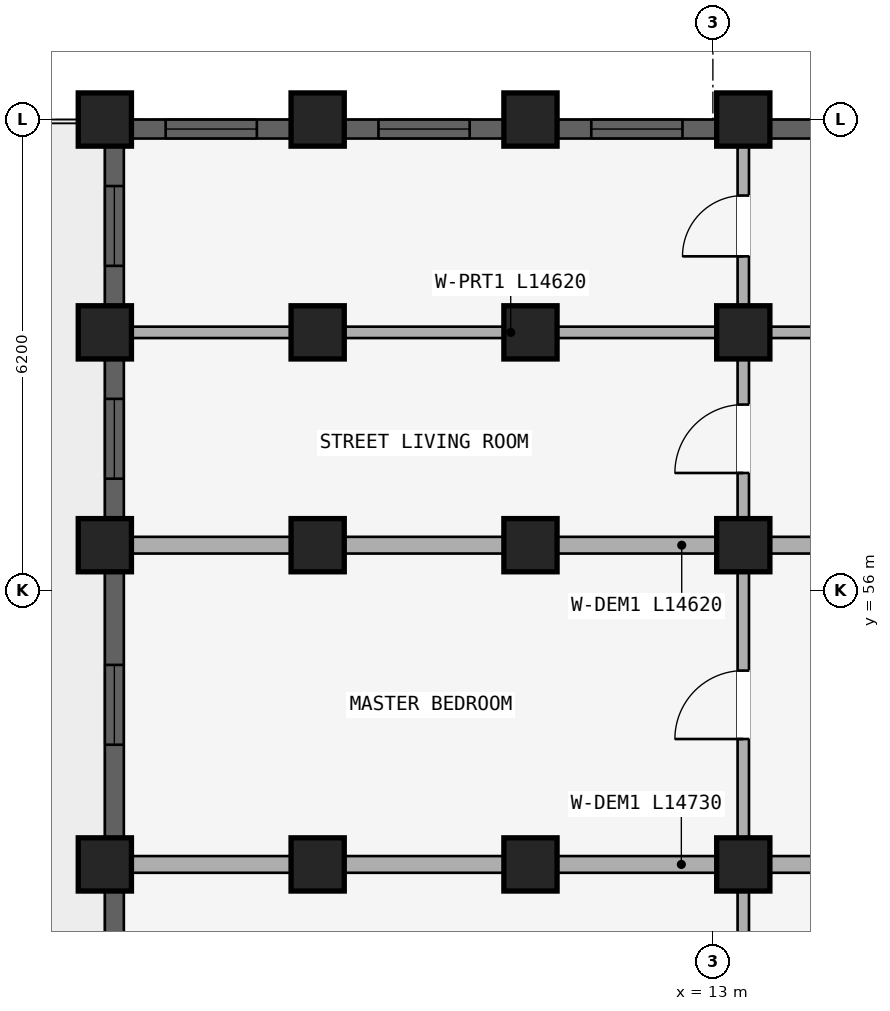
"""IFC4 building model, lengths in metres.
Left out: names, types, materials, properties, quantities, classifications, styles, units other than length and angle.
Written with IfcOpenShell. Run it as: python <this file> out.ifc"""

import sys

from ifc_helpers import new_model, si_unit, direction, frame, frame_2d, origin, origin_2d, place, context, subcontext, project, spatial, rectangle, extrude, element, fill, save


model = new_model("IFC4")
c1 = context("Model", 3, precision=1e-05, world=origin(), true_north=direction((0.0, 1.0)))
c2 = subcontext(c1, "Body", "Model", "MODEL_VIEW")
j1 = project(units=[si_unit("LENGTHUNIT", "METRE"), si_unit("PLANEANGLEUNIT", "RADIAN")], contexts=[c1])
p1 = place(None, origin())
s1 = spatial("IfcSite", under=j1, at=p1, CompositionType="ELEMENT")
p2 = place(p1, origin())
s2 = spatial("IfcBuilding", under=s1, at=p2, CompositionType="ELEMENT")
p3 = place(p2, frame((0.0, 0.0, 21.3)))
s3 = spatial("IfcBuildingStorey", under=s2, at=p3, CompositionType="ELEMENT", Elevation=21.3)
for number, where, z_axis, x_axis in (
    (1, (13.4, 52.4, 0.0), (0.0, 0.0, 1.0), (1.0, 0.0, 0.0)),
    (2, (10.6, 52.4, 0.0), (0.0, 0.0, 1.0), (1.0, 0.0, 0.0)),
    (3, (7.8, 52.4, 0.0), (0.0, 0.0, 1.0), (1.0, 0.0, 0.0)),
):
    element("IfcColumn", number, at=place(p3, frame(where, z_axis=z_axis, x_axis=x_axis)), inside=s3, PredefinedType="COLUMN", context=c2, shape_type="SweptSolid", body=[
        extrude(rectangle(XDim=0.7, YDim=0.7, at=origin_2d()), origin(), (0.0, 0.0, 1.0), 2.93),
    ])
p4 = place(p3, frame((5.0, 52.4, 0.0), z_axis=(0.0, 0.0, 1.0), x_axis=(1.0, 0.0, 0.0)))
e4 = element("IfcColumn", 4, at=p4, inside=s3, PredefinedType="COLUMN", context=c2, shape_type="SweptSolid", body=[
    extrude(rectangle(XDim=0.7, YDim=0.7, at=origin_2d()), origin(), (0.0, 0.0, 1.0), 2.97),
])
for number, where, z_axis, x_axis in (
    (5, (13.4, 56.6, 0.0), (0.0, 0.0, 1.0), (1.0, 0.0, 0.0)),
    (6, (10.6, 56.6, 0.0), (0.0, 0.0, 1.0), (1.0, 0.0, 0.0)),
    (7, (7.8, 56.6, 0.0), (0.0, 0.0, 1.0), (1.0, 0.0, 0.0)),
):
    element("IfcColumn", number, at=place(p3, frame(where, z_axis=z_axis, x_axis=x_axis)), inside=s3, PredefinedType="COLUMN", context=c2, shape_type="SweptSolid", body=[
        extrude(rectangle(XDim=0.7, YDim=0.7, at=origin_2d()), origin(), (0.0, 0.0, 1.0), 2.93),
    ])
p5 = place(p3, frame((5.0, 56.6, 0.0), z_axis=(0.0, 0.0, 1.0), x_axis=(1.0, 0.0, 0.0)))
e8 = element("IfcColumn", 8, at=p5, inside=s3, PredefinedType="COLUMN", context=c2, shape_type="SweptSolid", body=[
    extrude(rectangle(XDim=0.7, YDim=0.7, at=origin_2d()), origin(), (0.0, 0.0, 1.0), 2.97),
])
for number, where, z_axis, x_axis in (
    (9, (13.4, 59.4, 0.0), (0.0, 0.0, 1.0), (1.0, 0.0, 0.0)),
    (10, (10.6, 59.4, 0.0), (0.0, 0.0, 1.0), (1.0, 0.0, 0.0)),
    (11, (7.8, 59.4, 0.0), (0.0, 0.0, 1.0), (1.0, 0.0, 0.0)),
):
    element("IfcColumn", number, at=place(p3, frame(where, z_axis=z_axis, x_axis=x_axis)), inside=s3, PredefinedType="COLUMN", context=c2, shape_type="SweptSolid", body=[
        extrude(rectangle(XDim=0.7, YDim=0.7, at=origin_2d()), origin(), (0.0, 0.0, 1.0), 2.93),
    ])
p6 = place(p3, frame((5.0, 59.4, 0.0), z_axis=(0.0, 0.0, 1.0), x_axis=(1.0, 0.0, 0.0)))
e12 = element("IfcColumn", 12, at=p6, inside=s3, PredefinedType="COLUMN", context=c2, shape_type="SweptSolid", body=[
    extrude(rectangle(XDim=0.7, YDim=0.7, at=origin_2d()), origin(), (0.0, 0.0, 1.0), 2.97),
])
for number, where, z_axis, x_axis in (
    (13, (13.4, 62.2, 0.0), (0.0, 0.0, 1.0), (1.0, 0.0, 0.0)),
    (14, (10.6, 62.2, 0.0), (0.0, 0.0, 1.0), (1.0, 0.0, 0.0)),
    (15, (7.8, 62.2, 0.0), (0.0, 0.0, 1.0), (1.0, 0.0, 0.0)),
):
    element("IfcColumn", number, at=place(p3, frame(where, z_axis=z_axis, x_axis=x_axis)), inside=s3, PredefinedType="COLUMN", context=c2, shape_type="SweptSolid", body=[
        extrude(rectangle(XDim=0.7, YDim=0.7, at=origin_2d()), origin(), (0.0, 0.0, 1.0), 2.93),
    ])
p7 = place(p3, frame((5.0, 62.2, 0.0), z_axis=(0.0, 0.0, 1.0), x_axis=(1.0, 0.0, 0.0)))
e16 = element("IfcColumn", 16, at=p7, inside=s3, PredefinedType="COLUMN", context=c2, shape_type="SweptSolid", body=[
    extrude(rectangle(XDim=0.7, YDim=0.7, at=origin_2d()), origin(), (0.0, 0.0, 1.0), 2.97),
])
p8 = place(p3, frame((13.4, 48.43, 0.0), z_axis=(0.0, 0.0, 1.0), x_axis=(0.0, 1.0, 0.0)))
e17 = element("IfcWall", 17, at=p8, inside=s3, PredefinedType="PARTITIONING", context=c2, shape_type="SweptSolid", body=[
    extrude(rectangle(XDim=3.89, YDim=0.15, at=frame_2d((1.945, 0.0))), origin(), (0.0, 0.0, 1.0), 2.372),
])
p9 = place(p8, frame((1.495, 0.0, 0.0)))
e18 = element("IfcOpeningElement", 18, at=p9, cuts=e17, PredefinedType="OPENING", context=c2, shape_type="SweptSolid", body=[
    extrude(rectangle(XDim=0.9, YDim=2.1, at=frame_2d((0.45, 1.05))), frame((0.0, 0.085, 0.0), z_axis=(0.0, -1.0, 0.0), x_axis=(1.0, 0.0, 0.0)), (0.0, 0.0, 1.0), 0.17),
])
p10 = place(p3, frame((13.4, 52.48, 0.0), z_axis=(0.0, 0.0, 1.0), x_axis=(0.0, 1.0, 0.0)))
e19 = element("IfcWall", 19, at=p10, inside=s3, PredefinedType="PARTITIONING", context=c2, shape_type="SweptSolid", body=[
    extrude(rectangle(XDim=4.04, YDim=0.15, at=frame_2d((2.02, 0.0))), origin(), (0.0, 0.0, 1.0), 2.372),
])
p11 = place(p10, frame((1.57, 0.0, 0.0)))
e20 = element("IfcOpeningElement", 20, at=p11, cuts=e19, PredefinedType="OPENING", context=c2, shape_type="SweptSolid", body=[
    extrude(rectangle(XDim=0.9, YDim=2.1, at=frame_2d((0.45, 1.05))), frame((0.0, 0.085, 0.0), z_axis=(0.0, -1.0, 0.0), x_axis=(1.0, 0.0, 0.0)), (0.0, 0.0, 1.0), 0.17),
])
p12 = place(p3, frame((19.95, 52.4, 0.0), z_axis=(0.0, 0.0, 1.0), x_axis=(-1.0, 0.0, 0.0)))
e21 = element("IfcWall", 21, at=p12, inside=s3, PredefinedType="STANDARD", context=c2, shape_type="SweptSolid", body=[
    extrude(rectangle(XDim=14.73, YDim=0.22, at=frame_2d((7.365, 0.0))), origin(), (0.0, 0.0, 1.0), 2.372),
])
p13 = place(p3, frame((13.4, 56.68, 0.0), z_axis=(0.0, 0.0, 1.0), x_axis=(0.0, 1.0, 0.0)))
e22 = element("IfcWall", 22, at=p13, inside=s3, PredefinedType="PLUMBINGWALL", context=c2, shape_type="SweptSolid", body=[
    extrude(rectangle(XDim=2.64, YDim=0.15, at=frame_2d((1.32, 0.0))), origin(), (0.0, 0.0, 1.0), 2.372),
])
p14 = place(p13, frame((0.87, 0.0, 0.0)))
e23 = element("IfcOpeningElement", 23, at=p14, cuts=e22, PredefinedType="OPENING", context=c2, shape_type="SweptSolid", body=[
    extrude(rectangle(XDim=0.9, YDim=2.1, at=frame_2d((0.45, 1.05))), frame((0.0, 0.085, 0.0), z_axis=(0.0, -1.0, 0.0), x_axis=(1.0, 0.0, 0.0)), (0.0, 0.0, 1.0), 0.17),
])
p15 = place(p3, frame((19.9, 56.6, 0.0), z_axis=(0.0, 0.0, 1.0), x_axis=(-1.0, 0.0, 0.0)))
e24 = element("IfcWall", 24, at=p15, inside=s3, PredefinedType="STANDARD", context=c2, shape_type="SweptSolid", body=[
    extrude(rectangle(XDim=14.62, YDim=0.22, at=frame_2d((7.31, 0.0))), origin(), (0.0, 0.0, 1.0), 2.372),
])
p16 = place(p3, frame((13.4, 59.48, 0.0), z_axis=(0.0, 0.0, 1.0), x_axis=(0.0, 1.0, 0.0)))
e25 = element("IfcWall", 25, at=p16, inside=s3, PredefinedType="PLUMBINGWALL", context=c2, shape_type="SweptSolid", body=[
    extrude(rectangle(XDim=2.64, YDim=0.15, at=frame_2d((1.32, 0.0))), origin(), (0.0, 0.0, 1.0), 2.372),
])
p17 = place(p16, frame((0.92, 0.0, 0.0)))
e26 = element("IfcOpeningElement", 26, at=p17, cuts=e25, PredefinedType="OPENING", context=c2, shape_type="SweptSolid", body=[
    extrude(rectangle(XDim=0.8, YDim=2.1, at=frame_2d((0.4, 1.05))), frame((0.0, 0.085, 0.0), z_axis=(0.0, -1.0, 0.0), x_axis=(1.0, 0.0, 0.0)), (0.0, 0.0, 1.0), 0.17),
])
p18 = place(p3, frame((19.9, 59.4, 0.0), z_axis=(0.0, 0.0, 1.0), x_axis=(-1.0, 0.0, 0.0)))
e27 = element("IfcWall", 27, at=p18, inside=s3, PredefinedType="PARTITIONING", context=c2, shape_type="SweptSolid", body=[
    extrude(rectangle(XDim=14.62, YDim=0.15, at=frame_2d((7.31, 0.0))), origin(), (0.0, 0.0, 1.0), 2.372),
])
p19 = place(p18, frame((2.75, 0.0, 0.0)))
e28 = element("IfcOpeningElement", 28, at=p19, cuts=e27, PredefinedType="OPENING", context=c2, shape_type="SweptSolid", body=[
    extrude(rectangle(XDim=0.9, YDim=2.1, at=frame_2d((0.45, 1.05))), frame((0.0, 0.085, 0.0), z_axis=(0.0, -1.0, 0.0), x_axis=(1.0, 0.0, 0.0)), (0.0, 0.0, 1.0), 0.17),
])
p20 = place(p3, frame((5.125, 48.553, 0.0), z_axis=(0.0, 0.0, 1.0), x_axis=(0.0, 1.0, 0.0)))
e29 = element("IfcWall", 29, at=p20, inside=s3, PredefinedType="STANDARD", context=c2, shape_type="SweptSolid", body=[
    extrude(rectangle(XDim=3.493, YDim=0.25, at=frame_2d((1.747, 0.0))), origin(), (0.0, 0.0, 1.0), 2.48),
])
p21 = place(p20, frame((1.221, 0.0, 0.88)))
e30 = element("IfcOpeningElement", 30, at=p21, cuts=e29, PredefinedType="OPENING", context=c2, shape_type="SweptSolid", body=[
    extrude(rectangle(XDim=1.05, YDim=1.25, at=frame_2d((0.525, 0.625))), frame((0.0, 0.135, 0.0), z_axis=(0.0, -1.0, 0.0), x_axis=(1.0, 0.0, 0.0)), (0.0, 0.0, 1.0), 0.27),
])
p22 = place(p3, frame((5.125, 52.753, 0.0), z_axis=(0.0, 0.0, 1.0), x_axis=(0.0, 1.0, 0.0)))
e31 = element("IfcWall", 31, at=p22, inside=s3, PredefinedType="STANDARD", context=c2, shape_type="SweptSolid", body=[
    extrude(rectangle(XDim=3.493, YDim=0.25, at=frame_2d((1.747, 0.0))), origin(), (0.0, 0.0, 1.0), 2.48),
])
p23 = place(p22, frame((1.221, 0.0, 0.88)))
e32 = element("IfcOpeningElement", 32, at=p23, cuts=e31, PredefinedType="OPENING", context=c2, shape_type="SweptSolid", body=[
    extrude(rectangle(XDim=1.05, YDim=1.25, at=frame_2d((0.525, 0.625))), frame((0.0, 0.135, 0.0), z_axis=(0.0, -1.0, 0.0), x_axis=(1.0, 0.0, 0.0)), (0.0, 0.0, 1.0), 0.27),
])
p24 = place(p3, frame((5.125, 56.954, 0.0), z_axis=(0.0, 0.0, 1.0), x_axis=(0.0, 1.0, 0.0)))
e33 = element("IfcWall", 33, at=p24, inside=s3, PredefinedType="STANDARD", context=c2, shape_type="SweptSolid", body=[
    extrude(rectangle(XDim=2.093, YDim=0.25, at=frame_2d((1.046, 0.0))), origin(), (0.0, 0.0, 1.0), 2.48),
])
p25 = place(p24, frame((0.521, 0.0, 0.88)))
e34 = element("IfcOpeningElement", 34, at=p25, cuts=e33, PredefinedType="OPENING", context=c2, shape_type="SweptSolid", body=[
    extrude(rectangle(XDim=1.05, YDim=1.25, at=frame_2d((0.525, 0.625))), frame((0.0, 0.135, 0.0), z_axis=(0.0, -1.0, 0.0), x_axis=(1.0, 0.0, 0.0)), (0.0, 0.0, 1.0), 0.27),
])
p26 = place(p3, frame((5.125, 59.753, 0.0), z_axis=(0.0, 0.0, 1.0), x_axis=(0.0, 1.0, 0.0)))
e35 = element("IfcWall", 35, at=p26, inside=s3, PredefinedType="STANDARD", context=c2, shape_type="SweptSolid", body=[
    extrude(rectangle(XDim=2.093, YDim=0.25, at=frame_2d((1.046, 0.0))), origin(), (0.0, 0.0, 1.0), 2.48),
])
p27 = place(p26, frame((0.521, 0.0, 0.88)))
e36 = element("IfcOpeningElement", 36, at=p27, cuts=e35, PredefinedType="OPENING", context=c2, shape_type="SweptSolid", body=[
    extrude(rectangle(XDim=1.05, YDim=1.25, at=frame_2d((0.525, 0.625))), frame((0.0, 0.135, 0.0), z_axis=(0.0, -1.0, 0.0), x_axis=(1.0, 0.0, 0.0)), (0.0, 0.0, 1.0), 0.27),
])
p28 = place(p3, frame((19.771, 62.075, 0.0), z_axis=(0.0, 0.0, 1.0), x_axis=(-1.0, 0.0, 0.0)))
e37 = element("IfcWall", 37, at=p28, inside=s3, PredefinedType="STANDARD", context=c2, shape_type="SweptSolid", body=[
    extrude(rectangle(XDim=6.018, YDim=0.25, at=frame_2d((3.009, 0.0))), origin(), (0.0, 0.0, 1.0), 2.372),
])
p29 = place(p28, frame((2.322, 0.0, 0.522)))
e38 = element("IfcOpeningElement", 38, at=p29, cuts=e37, PredefinedType="OPENING", context=c2, shape_type="SweptSolid", body=[
    extrude(rectangle(XDim=1.5, YDim=1.65, at=frame_2d((0.75, 0.825))), frame((0.0, 0.135, 0.0), z_axis=(0.0, -1.0, 0.0), x_axis=(1.0, 0.0, 0.0)), (0.0, 0.0, 1.0), 0.27),
])
p30 = place(p3, frame((13.046, 62.075, 0.0), z_axis=(0.0, 0.0, 1.0), x_axis=(-1.0, 0.0, 0.0)))
e39 = element("IfcWall", 39, at=p30, inside=s3, PredefinedType="STANDARD", context=c2, shape_type="SweptSolid", body=[
    extrude(rectangle(XDim=2.093, YDim=0.25, at=frame_2d((1.046, 0.0))), origin(), (0.0, 0.0, 1.0), 2.372),
])
p31 = place(p30, frame((0.447, 0.0, 0.672)))
e40 = element("IfcOpeningElement", 40, at=p31, cuts=e39, PredefinedType="OPENING", context=c2, shape_type="SweptSolid", body=[
    extrude(rectangle(XDim=1.2, YDim=1.5, at=frame_2d((0.6, 0.75))), frame((0.0, 0.135, 0.0), z_axis=(0.0, -1.0, 0.0), x_axis=(1.0, 0.0, 0.0)), (0.0, 0.0, 1.0), 0.27),
])
p32 = place(p3, frame((10.247, 62.075, 0.0), z_axis=(0.0, 0.0, 1.0), x_axis=(-1.0, 0.0, 0.0)))
e41 = element("IfcWall", 41, at=p32, inside=s3, PredefinedType="STANDARD", context=c2, shape_type="SweptSolid", body=[
    extrude(rectangle(XDim=2.093, YDim=0.25, at=frame_2d((1.046, 0.0))), origin(), (0.0, 0.0, 1.0), 2.372),
])
p33 = place(p32, frame((0.447, 0.0, 0.672)))
e42 = element("IfcOpeningElement", 42, at=p33, cuts=e41, PredefinedType="OPENING", context=c2, shape_type="SweptSolid", body=[
    extrude(rectangle(XDim=1.2, YDim=1.5, at=frame_2d((0.6, 0.75))), frame((0.0, 0.135, 0.0), z_axis=(0.0, -1.0, 0.0), x_axis=(1.0, 0.0, 0.0)), (0.0, 0.0, 1.0), 0.27),
])
p34 = place(p3, frame((7.447, 62.075, 0.0), z_axis=(0.0, 0.0, 1.0), x_axis=(-1.0, 0.0, 0.0)))
e43 = element("IfcWall", 43, at=p34, inside=s3, PredefinedType="STANDARD", context=c2, shape_type="SweptSolid", body=[
    extrude(rectangle(XDim=2.093, YDim=0.25, at=frame_2d((1.046, 0.0))), origin(), (0.0, 0.0, 1.0), 2.412),
])
p35 = place(p34, frame((0.447, 0.0, 0.712)))
e44 = element("IfcOpeningElement", 44, at=p35, cuts=e43, PredefinedType="OPENING", context=c2, shape_type="SweptSolid", body=[
    extrude(rectangle(XDim=1.2, YDim=1.5, at=frame_2d((0.6, 0.75))), frame((0.0, 0.135, 0.0), z_axis=(0.0, -1.0, 0.0), x_axis=(1.0, 0.0, 0.0)), (0.0, 0.0, 1.0), 0.27),
])
p36 = place(p23, origin())
e45 = element("IfcWindow", 45, at=p36, inside=s3, PartitioningType="SINGLE_PANEL", PredefinedType="WINDOW", context=c2, shape_type="SweptSolid", body=[
    extrude(rectangle(XDim=1.05, YDim=1.25, at=frame_2d((0.525, 0.625))), frame((0.0, 0.03, 0.0), z_axis=(0.0, -1.0, 0.0), x_axis=(1.0, 0.0, 0.0)), (0.0, 0.0, 1.0), 0.06),
])
fill(e32, e45)
p37 = place(p25, origin())
e46 = element("IfcWindow", 46, at=p37, inside=s3, PartitioningType="SINGLE_PANEL", PredefinedType="WINDOW", context=c2, shape_type="SweptSolid", body=[
    extrude(rectangle(XDim=1.05, YDim=1.25, at=frame_2d((0.525, 0.625))), frame((0.0, 0.03, 0.0), z_axis=(0.0, -1.0, 0.0), x_axis=(1.0, 0.0, 0.0)), (0.0, 0.0, 1.0), 0.06),
])
fill(e34, e46)
p38 = place(p27, origin())
e47 = element("IfcWindow", 47, at=p38, inside=s3, PartitioningType="SINGLE_PANEL", PredefinedType="WINDOW", context=c2, shape_type="SweptSolid", body=[
    extrude(rectangle(XDim=1.05, YDim=1.25, at=frame_2d((0.525, 0.625))), frame((0.0, 0.03, 0.0), z_axis=(0.0, -1.0, 0.0), x_axis=(1.0, 0.0, 0.0)), (0.0, 0.0, 1.0), 0.06),
])
fill(e36, e47)
p39 = place(p31, origin())
e48 = element("IfcWindow", 48, at=p39, inside=s3, PartitioningType="SINGLE_PANEL", PredefinedType="WINDOW", context=c2, shape_type="SweptSolid", body=[
    extrude(rectangle(XDim=1.2, YDim=1.5, at=frame_2d((0.6, 0.75))), frame((0.0, 0.03, 0.0), z_axis=(0.0, -1.0, 0.0), x_axis=(1.0, 0.0, 0.0)), (0.0, 0.0, 1.0), 0.06),
])
fill(e40, e48)
p40 = place(p33, origin())
e49 = element("IfcWindow", 49, at=p40, inside=s3, PartitioningType="SINGLE_PANEL", PredefinedType="WINDOW", context=c2, shape_type="SweptSolid", body=[
    extrude(rectangle(XDim=1.2, YDim=1.5, at=frame_2d((0.6, 0.75))), frame((0.0, 0.03, 0.0), z_axis=(0.0, -1.0, 0.0), x_axis=(1.0, 0.0, 0.0)), (0.0, 0.0, 1.0), 0.06),
])
fill(e42, e49)
p41 = place(p35, origin())
e50 = element("IfcWindow", 50, at=p41, inside=s3, PartitioningType="SINGLE_PANEL", PredefinedType="WINDOW", context=c2, shape_type="SweptSolid", body=[
    extrude(rectangle(XDim=1.2, YDim=1.5, at=frame_2d((0.6, 0.75))), frame((0.0, 0.03, 0.0), z_axis=(0.0, -1.0, 0.0), x_axis=(1.0, 0.0, 0.0)), (0.0, 0.0, 1.0), 0.06),
])
fill(e44, e50)
p42 = place(p11, origin())
e51 = element("IfcDoor", 51, at=p42, inside=s3, OperationType="SINGLE_SWING_LEFT", PredefinedType="DOOR", context=c2, shape_type="SweptSolid", body=[
    extrude(rectangle(XDim=0.9, YDim=2.1, at=frame_2d((0.45, 1.05))), frame((0.0, 0.025, 0.0), z_axis=(0.0, -1.0, 0.0), x_axis=(1.0, 0.0, 0.0)), (0.0, 0.0, 1.0), 0.05),
])
fill(e20, e51)
p43 = place(p14, origin())
e52 = element("IfcDoor", 52, at=p43, inside=s3, OperationType="SINGLE_SWING_LEFT", PredefinedType="DOOR", context=c2, shape_type="SweptSolid", body=[
    extrude(rectangle(XDim=0.9, YDim=2.1, at=frame_2d((0.45, 1.05))), frame((0.0, 0.025, 0.0), z_axis=(0.0, -1.0, 0.0), x_axis=(1.0, 0.0, 0.0)), (0.0, 0.0, 1.0), 0.05),
])
fill(e23, e52)
p44 = place(p17, origin())
e53 = element("IfcDoor", 53, at=p44, inside=s3, OperationType="SINGLE_SWING_LEFT", PredefinedType="DOOR", context=c2, shape_type="SweptSolid", body=[
    extrude(rectangle(XDim=0.8, YDim=2.1, at=frame_2d((0.4, 1.05))), frame((0.0, 0.025, 0.0), z_axis=(0.0, -1.0, 0.0), x_axis=(1.0, 0.0, 0.0)), (0.0, 0.0, 1.0), 0.05),
])
fill(e26, e53)
save(model, sys.argv[1])
